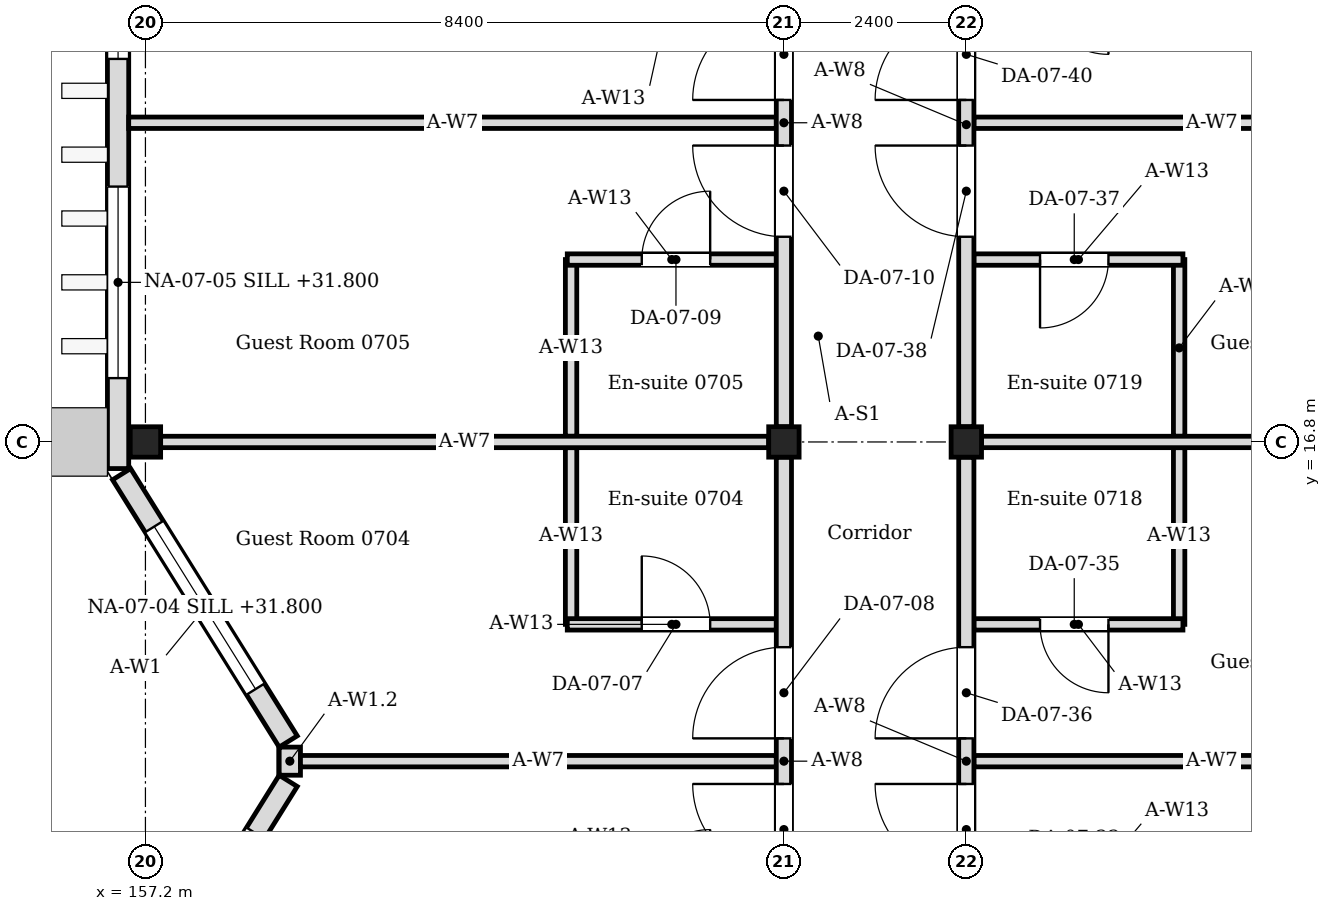
"""IFC4 building model, lengths in metres.
Left out: names, types, materials, properties, quantities, classifications, styles, units other than length and angle.
Written with IfcOpenShell. Run it as: python <this file> out.ifc"""

import sys

from ifc_helpers import new_model, si_unit, direction, frame, frame_2d, origin, origin_2d, place, context, subcontext, project, spatial, rectangle, i_section, extrude, element, fill, save


model = new_model("IFC4")
c1 = context("Model", 3, precision=1e-05, world=origin(), true_north=direction((0.0, 1.0)))
c2 = subcontext(c1, "Body", "Model", "MODEL_VIEW")
j1 = project(units=[si_unit("LENGTHUNIT", "METRE"), si_unit("PLANEANGLEUNIT", "RADIAN")], contexts=[c1])
p1 = place(None, origin())
s1 = spatial("IfcSite", under=j1, at=p1, CompositionType="ELEMENT")
p2 = place(p1, origin())
s2 = spatial("IfcBuilding", under=s1, at=p2, CompositionType="ELEMENT")
p3 = place(p2, frame((0.0, 0.0, 31.2)))
s3 = spatial("IfcBuildingStorey", under=s2, at=p3, CompositionType="ELEMENT", Elevation=31.2)
for number, where, z_axis, x_axis in (
    (1, (157.2, 16.8, 0.0), (0.0, 0.0, 1.0), (1.0, 0.0, 0.0)),
    (2, (165.6, 16.8, 0.0), (0.0, 0.0, 1.0), (1.0, 0.0, 0.0)),
    (3, (168.0, 16.8, 0.0), (0.0, 0.0, 1.0), (1.0, 0.0, 0.0)),
):
    element("IfcColumn", number, at=place(p3, frame(where, z_axis=z_axis, x_axis=x_axis)), inside=s3, PredefinedType="COLUMN", context=c2, shape_type="SweptSolid", body=[
        extrude(i_section(OverallWidth=0.4, OverallDepth=0.4, WebThickness=0.013, FlangeThickness=0.021, FilletRadius=0.022, at=origin_2d()), origin(), (0.0, 0.0, 1.0), 4.2),
    ])
p4 = place(p3, frame((156.886, 8.824, 0.0), z_axis=(0.0, 0.0, 1.0), x_axis=(0.529018946142, 0.848610013271, 0.0)))
e4 = element("IfcWall", 4, at=p4, inside=s3, PredefinedType="SOLIDWALL", context=c2, shape_type="SweptSolid", body=[
    extrude(rectangle(XDim=4.144, YDim=0.28, at=frame_2d((2.072, 0.0))), origin(), (0.0, 0.0, 1.0), 4.05),
])
p5 = place(p4, frame((0.812, 0.0, 0.6)))
e5 = element("IfcOpeningElement", 5, at=p5, cuts=e4, PredefinedType="OPENING", context=c2, shape_type="SweptSolid", body=[
    extrude(rectangle(XDim=2.52, YDim=2.4, at=frame_2d((1.26, 1.2))), frame((0.0, 0.15, 0.0), z_axis=(0.0, -1.0, 0.0), x_axis=(1.0, 0.0, 0.0)), (0.0, 0.0, 1.0), 0.3),
])
p6 = place(p3, frame((159.079, 12.859, 0.0), z_axis=(0.0, 0.0, 1.0), x_axis=(-0.528992500338, 0.848626498871, 0.0)))
e6 = element("IfcWall", 6, at=p6, inside=s3, PredefinedType="SOLIDWALL", context=c2, shape_type="SweptSolid", body=[
    extrude(rectangle(XDim=4.145, YDim=0.28, at=frame_2d((2.072, 0.0))), origin(), (0.0, 0.0, 1.0), 4.05),
])
p7 = place(p6, frame((0.812, 0.0, 0.6)))
e7 = element("IfcOpeningElement", 7, at=p7, cuts=e6, PredefinedType="OPENING", context=c2, shape_type="SweptSolid", body=[
    extrude(rectangle(XDim=2.52, YDim=2.4, at=frame_2d((1.26, 1.2))), frame((0.0, 0.15, 0.0), z_axis=(0.0, -1.0, 0.0), x_axis=(1.0, 0.0, 0.0)), (0.0, 0.0, 1.0), 0.3),
])
p8 = place(p3, frame((159.1, 12.415, 0.0), z_axis=(0.0, 0.0, 1.0), x_axis=(0.0, 1.0, 0.0)))
e8 = element("IfcWall", 8, at=p8, inside=s3, PredefinedType="SOLIDWALL", context=c2, shape_type="SweptSolid", body=[
    extrude(rectangle(XDim=0.37, YDim=0.28, at=frame_2d((0.185, 0.0))), origin(), (0.0, 0.0, 1.0), 3.604),
])
p9 = place(p3, frame((156.84, 16.45, 0.0), z_axis=(0.0, 0.0, 1.0), x_axis=(0.0, 1.0, 0.0)))
e9 = element("IfcWall", 9, at=p9, inside=s3, PredefinedType="SOLIDWALL", context=c2, shape_type="SweptSolid", body=[
    extrude(rectangle(XDim=25.9, YDim=0.28, at=frame_2d((12.95, 0.0))), origin(), (0.0, 0.0, 1.0), 4.05),
])
p10 = place(p9, frame((1.19, 0.0, 0.6)))
e10 = element("IfcOpeningElement", 10, at=p10, cuts=e9, PredefinedType="OPENING", context=c2, shape_type="SweptSolid", body=[
    extrude(rectangle(XDim=2.52, YDim=2.4, at=frame_2d((1.26, 1.2))), frame((0.0, 0.15, 0.0), z_axis=(0.0, -1.0, 0.0), x_axis=(1.0, 0.0, 0.0)), (0.0, 0.0, 1.0), 0.3),
])
p11 = place(p9, frame((5.39, 0.0, 0.6)))
e11 = element("IfcOpeningElement", 11, at=p11, cuts=e9, PredefinedType="OPENING", context=c2, shape_type="SweptSolid", body=[
    extrude(rectangle(XDim=2.52, YDim=2.4, at=frame_2d((1.26, 1.2))), frame((0.0, 0.15, 0.0), z_axis=(0.0, -1.0, 0.0), x_axis=(1.0, 0.0, 0.0)), (0.0, 0.0, 1.0), 0.3),
])
p12 = place(p9, frame((9.59, 0.0, 0.6)))
e12 = element("IfcOpeningElement", 12, at=p12, cuts=e9, PredefinedType="OPENING", context=c2, shape_type="SweptSolid", body=[
    extrude(rectangle(XDim=2.52, YDim=2.4, at=frame_2d((1.26, 1.2))), frame((0.0, 0.15, 0.0), z_axis=(0.0, -1.0, 0.0), x_axis=(1.0, 0.0, 0.0)), (0.0, 0.0, 1.0), 0.3),
])
p13 = place(p9, frame((13.79, 0.0, 0.6)))
e13 = element("IfcOpeningElement", 13, at=p13, cuts=e9, PredefinedType="OPENING", context=c2, shape_type="SweptSolid", body=[
    extrude(rectangle(XDim=2.52, YDim=2.4, at=frame_2d((1.26, 1.2))), frame((0.0, 0.15, 0.0), z_axis=(0.0, -1.0, 0.0), x_axis=(1.0, 0.0, 0.0)), (0.0, 0.0, 1.0), 0.3),
])
p14 = place(p9, frame((17.99, 0.0, 0.45)))
e14 = element("IfcOpeningElement", 14, at=p14, cuts=e9, PredefinedType="OPENING", context=c2, shape_type="SweptSolid", body=[
    extrude(rectangle(XDim=2.52, YDim=2.1, at=frame_2d((1.26, 1.05))), frame((0.0, 0.15, 0.0), z_axis=(0.0, -1.0, 0.0), x_axis=(1.0, 0.0, 0.0)), (0.0, 0.0, 1.0), 0.3),
])
p15 = place(p9, frame((22.19, 0.0, 0.6)))
e15 = element("IfcOpeningElement", 15, at=p15, cuts=e9, PredefinedType="OPENING", context=c2, shape_type="SweptSolid", body=[
    extrude(rectangle(XDim=2.52, YDim=2.4, at=frame_2d((1.26, 1.2))), frame((0.0, 0.15, 0.0), z_axis=(0.0, -1.0, 0.0), x_axis=(1.0, 0.0, 0.0)), (0.0, 0.0, 1.0), 0.3),
])
p16 = place(p3, frame((162.8, 14.4, 0.0), z_axis=(0.0, 0.0, 1.0), x_axis=(0.0, 1.0, 0.0)))
e16 = element("IfcWall", 16, at=p16, inside=s3, PredefinedType="PARTITIONING", context=c2, shape_type="SweptSolid", body=[
    extrude(rectangle(XDim=2.325, YDim=0.15, at=frame_2d((1.163, 0.0))), origin(), (0.0, 0.0, 1.0), 4.05),
])
p17 = place(p3, frame((162.75, 14.4, 0.0), z_axis=(0.0, 0.0, 1.0), x_axis=(1.0, 0.0, 0.0)))
e17 = element("IfcWall", 17, at=p17, inside=s3, PredefinedType="PARTITIONING", context=c2, shape_type="SweptSolid", body=[
    extrude(rectangle(XDim=2.75, YDim=0.15, at=frame_2d((1.375, 0.0))), origin(), (0.0, 0.0, 1.0), 4.05),
])
p18 = place(p17, frame((0.98, 0.0, 0.0)))
e18 = element("IfcOpeningElement", 18, at=p18, cuts=e17, PredefinedType="OPENING", context=c2, shape_type="SweptSolid", body=[
    extrude(rectangle(XDim=0.9, YDim=2.1, at=frame_2d((0.45, 1.05))), frame((0.0, 0.085, 0.0), z_axis=(0.0, -1.0, 0.0), x_axis=(1.0, 0.0, 0.0)), (0.0, 0.0, 1.0), 0.17),
])
p19 = place(p3, frame((162.8, 16.875, 0.0), z_axis=(0.0, 0.0, 1.0), x_axis=(0.0, 1.0, 0.0)))
e19 = element("IfcWall", 19, at=p19, inside=s3, PredefinedType="PARTITIONING", context=c2, shape_type="SweptSolid", body=[
    extrude(rectangle(XDim=2.325, YDim=0.15, at=frame_2d((1.163, 0.0))), origin(), (0.0, 0.0, 1.0), 4.05),
])
p20 = place(p3, frame((162.75, 19.2, 0.0), z_axis=(0.0, 0.0, 1.0), x_axis=(1.0, 0.0, 0.0)))
e20 = element("IfcWall", 20, at=p20, inside=s3, PredefinedType="PARTITIONING", context=c2, shape_type="SweptSolid", body=[
    extrude(rectangle(XDim=2.75, YDim=0.15, at=frame_2d((1.375, 0.0))), origin(), (0.0, 0.0, 1.0), 4.05),
])
p21 = place(p20, frame((0.98, 0.0, 0.0)))
e21 = element("IfcOpeningElement", 21, at=p21, cuts=e20, PredefinedType="OPENING", context=c2, shape_type="SweptSolid", body=[
    extrude(rectangle(XDim=0.9, YDim=2.1, at=frame_2d((0.45, 1.05))), frame((0.0, 0.085, 0.0), z_axis=(0.0, -1.0, 0.0), x_axis=(1.0, 0.0, 0.0)), (0.0, 0.0, 1.0), 0.17),
])
p22 = place(p3, frame((170.8, 14.4, 0.0), z_axis=(0.0, 0.0, 1.0), x_axis=(0.0, 1.0, 0.0)))
e22 = element("IfcWall", 22, at=p22, inside=s3, PredefinedType="PARTITIONING", context=c2, shape_type="SweptSolid", body=[
    extrude(rectangle(XDim=2.325, YDim=0.15, at=frame_2d((1.163, 0.0))), origin(), (0.0, 0.0, 1.0), 4.05),
])
p23 = place(p3, frame((170.85, 14.4, 0.0), z_axis=(0.0, 0.0, 1.0), x_axis=(-1.0, 0.0, 0.0)))
e23 = element("IfcWall", 23, at=p23, inside=s3, PredefinedType="PARTITIONING", context=c2, shape_type="SweptSolid", body=[
    extrude(rectangle(XDim=2.75, YDim=0.15, at=frame_2d((1.375, 0.0))), origin(), (0.0, 0.0, 1.0), 4.05),
])
p24 = place(p23, frame((0.98, 0.0, 0.0)))
e24 = element("IfcOpeningElement", 24, at=p24, cuts=e23, PredefinedType="OPENING", context=c2, shape_type="SweptSolid", body=[
    extrude(rectangle(XDim=0.9, YDim=2.1, at=frame_2d((0.45, 1.05))), frame((0.0, 0.085, 0.0), z_axis=(0.0, -1.0, 0.0), x_axis=(1.0, 0.0, 0.0)), (0.0, 0.0, 1.0), 0.17),
])
p25 = place(p3, frame((170.8, 16.875, 0.0), z_axis=(0.0, 0.0, 1.0), x_axis=(0.0, 1.0, 0.0)))
e25 = element("IfcWall", 25, at=p25, inside=s3, PredefinedType="PARTITIONING", context=c2, shape_type="SweptSolid", body=[
    extrude(rectangle(XDim=2.325, YDim=0.15, at=frame_2d((1.163, 0.0))), origin(), (0.0, 0.0, 1.0), 4.05),
])
p26 = place(p3, frame((170.85, 19.2, 0.0), z_axis=(0.0, 0.0, 1.0), x_axis=(-1.0, 0.0, 0.0)))
e26 = element("IfcWall", 26, at=p26, inside=s3, PredefinedType="PARTITIONING", context=c2, shape_type="SweptSolid", body=[
    extrude(rectangle(XDim=2.75, YDim=0.15, at=frame_2d((1.375, 0.0))), origin(), (0.0, 0.0, 1.0), 4.05),
])
p27 = place(p26, frame((0.98, 0.0, 0.0)))
e27 = element("IfcOpeningElement", 27, at=p27, cuts=e26, PredefinedType="OPENING", context=c2, shape_type="SweptSolid", body=[
    extrude(rectangle(XDim=0.9, YDim=2.1, at=frame_2d((0.45, 1.05))), frame((0.0, 0.085, 0.0), z_axis=(0.0, -1.0, 0.0), x_axis=(1.0, 0.0, 0.0)), (0.0, 0.0, 1.0), 0.17),
])
for number, where, z_axis, x_axis in (
    (28, (157.4, 16.8, 0.0), (0.0, 0.0, 1.0), (1.0, 0.0, 0.0)),
    (29, (168.2, 16.8, 0.0), (0.0, 0.0, 1.0), (1.0, 0.0, 0.0)),
):
    element("IfcWall", number, at=place(p3, frame(where, z_axis=z_axis, x_axis=x_axis)), inside=s3, PredefinedType="PARTITIONING", context=c2, shape_type="SweptSolid", body=[
        extrude(rectangle(XDim=8.0, YDim=0.15, at=frame_2d((4.0, 0.0))), origin(), (0.0, 0.0, 1.0), 3.604),
    ])
p28 = place(p3, frame((159.24, 12.6, 0.0), z_axis=(0.0, 0.0, 1.0), x_axis=(1.0, 0.0, 0.0)))
e30 = element("IfcWall", 30, at=p28, inside=s3, PredefinedType="PARTITIONING", context=c2, shape_type="SweptSolid", body=[
    extrude(rectangle(XDim=6.26, YDim=0.15, at=frame_2d((3.13, 0.0))), origin(), (0.0, 0.0, 1.0), 3.604),
])
p29 = place(p3, frame((156.98, 21.0, 0.0), z_axis=(0.0, 0.0, 1.0), x_axis=(1.0, 0.0, 0.0)))
e31 = element("IfcWall", 31, at=p29, inside=s3, PredefinedType="PARTITIONING", context=c2, shape_type="SweptSolid", body=[
    extrude(rectangle(XDim=8.52, YDim=0.15, at=frame_2d((4.26, 0.0))), origin(), (0.0, 0.0, 1.0), 3.604),
])
for number, where, z_axis, x_axis in (
    (32, (168.1, 12.6, 0.0), (0.0, 0.0, 1.0), (1.0, 0.0, 0.0)),
    (33, (168.1, 21.0, 0.0), (0.0, 0.0, 1.0), (1.0, 0.0, 0.0)),
):
    element("IfcWall", number, at=place(p3, frame(where, z_axis=z_axis, x_axis=x_axis)), inside=s3, PredefinedType="PARTITIONING", context=c2, shape_type="SweptSolid", body=[
        extrude(rectangle(XDim=6.26, YDim=0.15, at=frame_2d((3.13, 0.0))), origin(), (0.0, 0.0, 1.0), 3.604),
    ])
p30 = place(p3, frame((165.6, 8.6, 0.0), z_axis=(0.0, 0.0, 1.0), x_axis=(0.0, 1.0, 0.0)))
e34 = element("IfcWall", 34, at=p30, inside=s3, PredefinedType="PARTITIONING", context=c2, shape_type="SweptSolid", body=[
    extrude(rectangle(XDim=8.0, YDim=0.2, at=frame_2d((4.0, 0.0))), origin(), (0.0, 0.0, 1.0), 3.45),
])
p31 = place(p30, frame((2.5, 0.0, 0.0)))
e35 = element("IfcOpeningElement", 35, at=p31, cuts=e34, PredefinedType="OPENING", context=c2, shape_type="SweptSolid", body=[
    extrude(rectangle(XDim=1.2, YDim=2.1, at=frame_2d((0.6, 1.05))), frame((0.0, 0.11, 0.0), z_axis=(0.0, -1.0, 0.0), x_axis=(1.0, 0.0, 0.0)), (0.0, 0.0, 1.0), 0.22),
])
p32 = place(p30, frame((4.3, 0.0, 0.0)))
e36 = element("IfcOpeningElement", 36, at=p32, cuts=e34, PredefinedType="OPENING", context=c2, shape_type="SweptSolid", body=[
    extrude(rectangle(XDim=1.2, YDim=2.1, at=frame_2d((0.6, 1.05))), frame((0.0, 0.11, 0.0), z_axis=(0.0, -1.0, 0.0), x_axis=(1.0, 0.0, 0.0)), (0.0, 0.0, 1.0), 0.22),
])
p33 = place(p3, frame((165.6, 17.0, 0.0), z_axis=(0.0, 0.0, 1.0), x_axis=(0.0, 1.0, 0.0)))
e37 = element("IfcWall", 37, at=p33, inside=s3, PredefinedType="PARTITIONING", context=c2, shape_type="SweptSolid", body=[
    extrude(rectangle(XDim=8.0, YDim=0.2, at=frame_2d((4.0, 0.0))), origin(), (0.0, 0.0, 1.0), 3.45),
])
p34 = place(p33, frame((2.5, 0.0, 0.0)))
e38 = element("IfcOpeningElement", 38, at=p34, cuts=e37, PredefinedType="OPENING", context=c2, shape_type="SweptSolid", body=[
    extrude(rectangle(XDim=1.2, YDim=2.1, at=frame_2d((0.6, 1.05))), frame((0.0, 0.11, 0.0), z_axis=(0.0, -1.0, 0.0), x_axis=(1.0, 0.0, 0.0)), (0.0, 0.0, 1.0), 0.22),
])
p35 = place(p33, frame((4.3, 0.0, 0.0)))
e39 = element("IfcOpeningElement", 39, at=p35, cuts=e37, PredefinedType="OPENING", context=c2, shape_type="SweptSolid", body=[
    extrude(rectangle(XDim=1.2, YDim=2.1, at=frame_2d((0.6, 1.05))), frame((0.0, 0.11, 0.0), z_axis=(0.0, -1.0, 0.0), x_axis=(1.0, 0.0, 0.0)), (0.0, 0.0, 1.0), 0.22),
])
p36 = place(p3, frame((168.0, 8.6, 0.0), z_axis=(0.0, 0.0, 1.0), x_axis=(0.0, 1.0, 0.0)))
e40 = element("IfcWall", 40, at=p36, inside=s3, PredefinedType="PARTITIONING", context=c2, shape_type="SweptSolid", body=[
    extrude(rectangle(XDim=8.0, YDim=0.2, at=frame_2d((4.0, 0.0))), origin(), (0.0, 0.0, 1.0), 3.45),
])
p37 = place(p36, frame((2.5, 0.0, 0.0)))
e41 = element("IfcOpeningElement", 41, at=p37, cuts=e40, PredefinedType="OPENING", context=c2, shape_type="SweptSolid", body=[
    extrude(rectangle(XDim=1.2, YDim=2.1, at=frame_2d((0.6, 1.05))), frame((0.0, 0.11, 0.0), z_axis=(0.0, -1.0, 0.0), x_axis=(1.0, 0.0, 0.0)), (0.0, 0.0, 1.0), 0.22),
])
p38 = place(p36, frame((4.3, 0.0, 0.0)))
e42 = element("IfcOpeningElement", 42, at=p38, cuts=e40, PredefinedType="OPENING", context=c2, shape_type="SweptSolid", body=[
    extrude(rectangle(XDim=1.2, YDim=2.1, at=frame_2d((0.6, 1.05))), frame((0.0, 0.11, 0.0), z_axis=(0.0, -1.0, 0.0), x_axis=(1.0, 0.0, 0.0)), (0.0, 0.0, 1.0), 0.22),
])
p39 = place(p3, frame((168.0, 17.0, 0.0), z_axis=(0.0, 0.0, 1.0), x_axis=(0.0, 1.0, 0.0)))
e43 = element("IfcWall", 43, at=p39, inside=s3, PredefinedType="PARTITIONING", context=c2, shape_type="SweptSolid", body=[
    extrude(rectangle(XDim=7.95, YDim=0.2, at=frame_2d((3.975, 0.0))), origin(), (0.0, 0.0, 1.0), 3.45),
])
p40 = place(p39, frame((2.5, 0.0, 0.0)))
e44 = element("IfcOpeningElement", 44, at=p40, cuts=e43, PredefinedType="OPENING", context=c2, shape_type="SweptSolid", body=[
    extrude(rectangle(XDim=1.2, YDim=2.1, at=frame_2d((0.6, 1.05))), frame((0.0, 0.11, 0.0), z_axis=(0.0, -1.0, 0.0), x_axis=(1.0, 0.0, 0.0)), (0.0, 0.0, 1.0), 0.22),
])
p41 = place(p39, frame((4.3, 0.0, 0.0)))
e45 = element("IfcOpeningElement", 45, at=p41, cuts=e43, PredefinedType="OPENING", context=c2, shape_type="SweptSolid", body=[
    extrude(rectangle(XDim=1.2, YDim=2.1, at=frame_2d((0.6, 1.05))), frame((0.0, 0.11, 0.0), z_axis=(0.0, -1.0, 0.0), x_axis=(1.0, 0.0, 0.0)), (0.0, 0.0, 1.0), 0.22),
])
p42 = place(p7, origin())
e46 = element("IfcWindow", 46, at=p42, inside=s3, PartitioningType="SINGLE_PANEL", PredefinedType="WINDOW", context=c2, shape_type="SweptSolid", body=[
    extrude(rectangle(XDim=2.52, YDim=2.4, at=frame_2d((1.26, 1.2))), frame((0.0, 0.03, 0.0), z_axis=(0.0, -1.0, 0.0), x_axis=(1.0, 0.0, 0.0)), (0.0, 0.0, 1.0), 0.06),
])
fill(e7, e46)
p43 = place(p10, origin())
e47 = element("IfcWindow", 47, at=p43, inside=s3, PartitioningType="SINGLE_PANEL", PredefinedType="WINDOW", context=c2, shape_type="SweptSolid", body=[
    extrude(rectangle(XDim=2.52, YDim=2.4, at=frame_2d((1.26, 1.2))), frame((0.0, 0.03, 0.0), z_axis=(0.0, -1.0, 0.0), x_axis=(1.0, 0.0, 0.0)), (0.0, 0.0, 1.0), 0.06),
])
fill(e10, e47)
p44 = place(p11, origin())
e48 = element("IfcWindow", 48, at=p44, inside=s3, PartitioningType="SINGLE_PANEL", PredefinedType="WINDOW", context=c2, shape_type="SweptSolid", body=[
    extrude(rectangle(XDim=2.52, YDim=2.4, at=frame_2d((1.26, 1.2))), frame((0.0, 0.03, 0.0), z_axis=(0.0, -1.0, 0.0), x_axis=(1.0, 0.0, 0.0)), (0.0, 0.0, 1.0), 0.06),
])
fill(e11, e48)
p45 = place(p31, origin())
e49 = element("IfcDoor", 49, at=p45, inside=s3, OperationType="SINGLE_SWING_RIGHT", PredefinedType="DOOR", context=c2, shape_type="SweptSolid", body=[
    extrude(rectangle(XDim=1.2, YDim=2.1, at=frame_2d((0.6, 1.05))), frame((0.0, 0.025, 0.0), z_axis=(0.0, -1.0, 0.0), x_axis=(1.0, 0.0, 0.0)), (0.0, 0.0, 1.0), 0.05),
])
fill(e35, e49)
p46 = place(p18, origin())
e50 = element("IfcDoor", 50, at=p46, inside=s3, OperationType="SINGLE_SWING_LEFT", PredefinedType="DOOR", context=c2, shape_type="SweptSolid", body=[
    extrude(rectangle(XDim=0.9, YDim=2.1, at=frame_2d((0.45, 1.05))), frame((0.0, 0.025, 0.0), z_axis=(0.0, -1.0, 0.0), x_axis=(1.0, 0.0, 0.0)), (0.0, 0.0, 1.0), 0.05),
])
fill(e18, e50)
p47 = place(p32, origin())
e51 = element("IfcDoor", 51, at=p47, inside=s3, OperationType="SINGLE_SWING_LEFT", PredefinedType="DOOR", context=c2, shape_type="SweptSolid", body=[
    extrude(rectangle(XDim=1.2, YDim=2.1, at=frame_2d((0.6, 1.05))), frame((0.0, 0.025, 0.0), z_axis=(0.0, -1.0, 0.0), x_axis=(1.0, 0.0, 0.0)), (0.0, 0.0, 1.0), 0.05),
])
fill(e36, e51)
p48 = place(p21, origin())
e52 = element("IfcDoor", 52, at=p48, inside=s3, OperationType="SINGLE_SWING_RIGHT", PredefinedType="DOOR", context=c2, shape_type="SweptSolid", body=[
    extrude(rectangle(XDim=0.9, YDim=2.1, at=frame_2d((0.45, 1.05))), frame((0.0, 0.025, 0.0), z_axis=(0.0, -1.0, 0.0), x_axis=(1.0, 0.0, 0.0)), (0.0, 0.0, 1.0), 0.05),
])
fill(e21, e52)
p49 = place(p34, origin())
e53 = element("IfcDoor", 53, at=p49, inside=s3, OperationType="SINGLE_SWING_RIGHT", PredefinedType="DOOR", context=c2, shape_type="SweptSolid", body=[
    extrude(rectangle(XDim=1.2, YDim=2.1, at=frame_2d((0.6, 1.05))), frame((0.0, 0.025, 0.0), z_axis=(0.0, -1.0, 0.0), x_axis=(1.0, 0.0, 0.0)), (0.0, 0.0, 1.0), 0.05),
])
fill(e38, e53)
p50 = place(p35, origin())
e54 = element("IfcDoor", 54, at=p50, inside=s3, OperationType="SINGLE_SWING_LEFT", PredefinedType="DOOR", context=c2, shape_type="SweptSolid", body=[
    extrude(rectangle(XDim=1.2, YDim=2.1, at=frame_2d((0.6, 1.05))), frame((0.0, 0.025, 0.0), z_axis=(0.0, -1.0, 0.0), x_axis=(1.0, 0.0, 0.0)), (0.0, 0.0, 1.0), 0.05),
])
fill(e39, e54)
p51 = place(p37, origin())
e55 = element("IfcDoor", 55, at=p51, inside=s3, OperationType="SINGLE_SWING_RIGHT", PredefinedType="DOOR", context=c2, shape_type="SweptSolid", body=[
    extrude(rectangle(XDim=1.2, YDim=2.1, at=frame_2d((0.6, 1.05))), frame((0.0, 0.025, 0.0), z_axis=(0.0, -1.0, 0.0), x_axis=(1.0, 0.0, 0.0)), (0.0, 0.0, 1.0), 0.05),
])
fill(e41, e55)
p52 = place(p24, origin())
e56 = element("IfcDoor", 56, at=p52, inside=s3, OperationType="SINGLE_SWING_LEFT", PredefinedType="DOOR", context=c2, shape_type="SweptSolid", body=[
    extrude(rectangle(XDim=0.9, YDim=2.1, at=frame_2d((0.45, 1.05))), frame((0.0, 0.025, 0.0), z_axis=(0.0, -1.0, 0.0), x_axis=(1.0, 0.0, 0.0)), (0.0, 0.0, 1.0), 0.05),
])
fill(e24, e56)
p53 = place(p38, origin())
e57 = element("IfcDoor", 57, at=p53, inside=s3, OperationType="SINGLE_SWING_LEFT", PredefinedType="DOOR", context=c2, shape_type="SweptSolid", body=[
    extrude(rectangle(XDim=1.2, YDim=2.1, at=frame_2d((0.6, 1.05))), frame((0.0, 0.025, 0.0), z_axis=(0.0, -1.0, 0.0), x_axis=(1.0, 0.0, 0.0)), (0.0, 0.0, 1.0), 0.05),
])
fill(e42, e57)
p54 = place(p27, origin())
e58 = element("IfcDoor", 58, at=p54, inside=s3, OperationType="SINGLE_SWING_RIGHT", PredefinedType="DOOR", context=c2, shape_type="SweptSolid", body=[
    extrude(rectangle(XDim=0.9, YDim=2.1, at=frame_2d((0.45, 1.05))), frame((0.0, 0.025, 0.0), z_axis=(0.0, -1.0, 0.0), x_axis=(1.0, 0.0, 0.0)), (0.0, 0.0, 1.0), 0.05),
])
fill(e27, e58)
p55 = place(p40, origin())
e59 = element("IfcDoor", 59, at=p55, inside=s3, OperationType="SINGLE_SWING_RIGHT", PredefinedType="DOOR", context=c2, shape_type="SweptSolid", body=[
    extrude(rectangle(XDim=1.2, YDim=2.1, at=frame_2d((0.6, 1.05))), frame((0.0, 0.025, 0.0), z_axis=(0.0, -1.0, 0.0), x_axis=(1.0, 0.0, 0.0)), (0.0, 0.0, 1.0), 0.05),
])
fill(e44, e59)
p56 = place(p41, origin())
e60 = element("IfcDoor", 60, at=p56, inside=s3, OperationType="SINGLE_SWING_LEFT", PredefinedType="DOOR", context=c2, shape_type="SweptSolid", body=[
    extrude(rectangle(XDim=1.2, YDim=2.1, at=frame_2d((0.6, 1.05))), frame((0.0, 0.025, 0.0), z_axis=(0.0, -1.0, 0.0), x_axis=(1.0, 0.0, 0.0)), (0.0, 0.0, 1.0), 0.05),
])
fill(e45, e60)
save(model, sys.argv[1])
